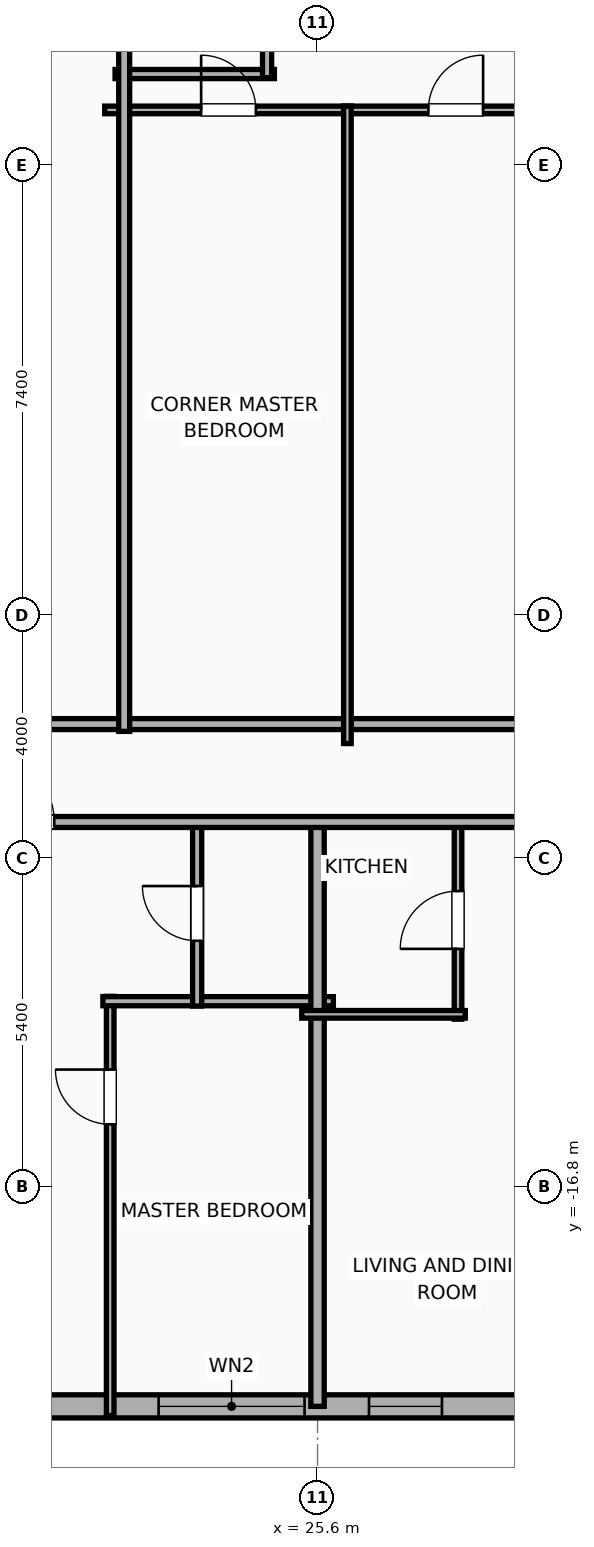
"""IFC4 building model, lengths in metres.
Left out: names, types, materials, properties, quantities, classifications, styles, units other than length and angle.
Written with IfcOpenShell. Run it as: python <this file> out.ifc"""

import sys

from ifc_helpers import new_model, si_unit, direction, frame, frame_2d, origin, place, context, subcontext, project, spatial, rectangle, extrude, element, fill, save


model = new_model("IFC4")
c1 = context("Model", 3, precision=1e-05, world=origin(), true_north=direction((0.0, 1.0)))
c2 = subcontext(c1, "Body", "Model", "MODEL_VIEW")
j1 = project(units=[si_unit("LENGTHUNIT", "METRE"), si_unit("PLANEANGLEUNIT", "RADIAN")], contexts=[c1])
p1 = place(None, origin())
s1 = spatial("IfcSite", under=j1, at=p1, CompositionType="ELEMENT")
p2 = place(p1, origin())
s2 = spatial("IfcBuilding", under=s1, at=p2, CompositionType="ELEMENT")
p3 = place(p2, frame((0.0, 0.0, 109.2)))
s3 = spatial("IfcBuildingStorey", under=s2, at=p3, CompositionType="ELEMENT", Elevation=109.2)
p4 = place(p3, frame((29.381, -20.41, 0.0), z_axis=(0.0, 0.0, 1.0), x_axis=(-1.0, 0.0, 0.0)))
e1 = element("IfcWall", 1, at=p4, inside=s3, PredefinedType="ELEMENTEDWALL", context=c2, shape_type="SweptSolid", body=[
    extrude(rectangle(XDim=54.763, YDim=0.38, at=frame_2d((27.381, 0.0))), origin(), (0.0, 0.0, 1.0), 3.65),
])
p5 = place(p4, frame((3.995, 0.0, 0.75)))
e2 = element("IfcOpeningElement", 2, at=p5, cuts=e1, PredefinedType="OPENING", context=c2, shape_type="SweptSolid", body=[
    extrude(rectangle(XDim=2.4, YDim=2.1, at=frame_2d((1.2, 1.05))), frame((0.0, 0.2, 0.0), z_axis=(0.0, -1.0, 0.0), x_axis=(1.0, 0.0, 0.0)), (0.0, 0.0, 1.0), 0.4),
])
p6 = place(p4, frame((18.486, 0.0, 0.75)))
e3 = element("IfcOpeningElement", 3, at=p6, cuts=e1, PredefinedType="OPENING", context=c2, shape_type="SweptSolid", body=[
    extrude(rectangle(XDim=2.4, YDim=2.1, at=frame_2d((1.2, 1.05))), frame((0.0, 0.2, 0.0), z_axis=(0.0, -1.0, 0.0), x_axis=(1.0, 0.0, 0.0)), (0.0, 0.0, 1.0), 0.4),
])
p7 = place(p4, frame((46.717, 0.0, 0.75)))
e4 = element("IfcOpeningElement", 4, at=p7, cuts=e1, PredefinedType="OPENING", context=c2, shape_type="SweptSolid", body=[
    extrude(rectangle(XDim=2.4, YDim=2.1, at=frame_2d((1.2, 1.05))), frame((0.0, 0.2, 0.0), z_axis=(0.0, -1.0, 0.0), x_axis=(1.0, 0.0, 0.0)), (0.0, 0.0, 1.0), 0.4),
])
p8 = place(p4, frame((52.651, 0.0, 0.75)))
e5 = element("IfcOpeningElement", 5, at=p8, cuts=e1, PredefinedType="OPENING", context=c2, shape_type="SweptSolid", body=[
    extrude(rectangle(XDim=1.2, YDim=2.05, at=frame_2d((0.6, 1.025))), frame((0.0, 0.2, 0.0), z_axis=(0.0, -1.0, 0.0), x_axis=(1.0, 0.0, 0.0)), (0.0, 0.0, 1.0), 0.4),
])
p9 = place(p4, frame((50.521, 0.0, 0.75)))
e6 = element("IfcOpeningElement", 6, at=p9, cuts=e1, PredefinedType="OPENING", context=c2, shape_type="SweptSolid", body=[
    extrude(rectangle(XDim=1.2, YDim=2.05, at=frame_2d((0.6, 1.025))), frame((0.0, 0.2, 0.0), z_axis=(0.0, -1.0, 0.0), x_axis=(1.0, 0.0, 0.0)), (0.0, 0.0, 1.0), 0.4),
])
p10 = place(p4, frame((40.191, 0.0, 0.75)))
e7 = element("IfcOpeningElement", 7, at=p10, cuts=e1, PredefinedType="OPENING", context=c2, shape_type="SweptSolid", body=[
    extrude(rectangle(XDim=1.2, YDim=2.05, at=frame_2d((0.6, 1.025))), frame((0.0, 0.2, 0.0), z_axis=(0.0, -1.0, 0.0), x_axis=(1.0, 0.0, 0.0)), (0.0, 0.0, 1.0), 0.4),
])
p11 = place(p4, frame((44.631, 0.0, 0.75)))
e8 = element("IfcOpeningElement", 8, at=p11, cuts=e1, PredefinedType="OPENING", context=c2, shape_type="SweptSolid", body=[
    extrude(rectangle(XDim=1.2, YDim=2.05, at=frame_2d((0.6, 1.025))), frame((0.0, 0.2, 0.0), z_axis=(0.0, -1.0, 0.0), x_axis=(1.0, 0.0, 0.0)), (0.0, 0.0, 1.0), 0.4),
])
p12 = place(p4, frame((36.561, 0.0, 0.75)))
e9 = element("IfcOpeningElement", 9, at=p12, cuts=e1, PredefinedType="OPENING", context=c2, shape_type="SweptSolid", body=[
    extrude(rectangle(XDim=1.2, YDim=2.05, at=frame_2d((0.6, 1.025))), frame((0.0, 0.2, 0.0), z_axis=(0.0, -1.0, 0.0), x_axis=(1.0, 0.0, 0.0)), (0.0, 0.0, 1.0), 0.4),
])
p13 = place(p4, frame((30.004, 0.0, 0.75)))
e10 = element("IfcOpeningElement", 10, at=p13, cuts=e1, PredefinedType="OPENING", context=c2, shape_type="SweptSolid", body=[
    extrude(rectangle(XDim=1.2, YDim=2.05, at=frame_2d((0.6, 1.025))), frame((0.0, 0.2, 0.0), z_axis=(0.0, -1.0, 0.0), x_axis=(1.0, 0.0, 0.0)), (0.0, 0.0, 1.0), 0.4),
])
p14 = place(p4, frame((33.599, 0.0, 0.75)))
e11 = element("IfcOpeningElement", 11, at=p14, cuts=e1, PredefinedType="OPENING", context=c2, shape_type="SweptSolid", body=[
    extrude(rectangle(XDim=1.2, YDim=2.05, at=frame_2d((0.6, 1.025))), frame((0.0, 0.2, 0.0), z_axis=(0.0, -1.0, 0.0), x_axis=(1.0, 0.0, 0.0)), (0.0, 0.0, 1.0), 0.4),
])
p15 = place(p4, frame((26.086, 0.0, 0.75)))
e12 = element("IfcOpeningElement", 12, at=p15, cuts=e1, PredefinedType="OPENING", context=c2, shape_type="SweptSolid", body=[
    extrude(rectangle(XDim=1.2, YDim=2.05, at=frame_2d((0.6, 1.025))), frame((0.0, 0.2, 0.0), z_axis=(0.0, -1.0, 0.0), x_axis=(1.0, 0.0, 0.0)), (0.0, 0.0, 1.0), 0.4),
])
p16 = place(p4, frame((22.626, 0.0, 0.75)))
e13 = element("IfcOpeningElement", 13, at=p16, cuts=e1, PredefinedType="OPENING", context=c2, shape_type="SweptSolid", body=[
    extrude(rectangle(XDim=1.2, YDim=2.05, at=frame_2d((0.6, 1.025))), frame((0.0, 0.2, 0.0), z_axis=(0.0, -1.0, 0.0), x_axis=(1.0, 0.0, 0.0)), (0.0, 0.0, 1.0), 0.4),
])
p17 = place(p4, frame((15.361, 0.0, 0.75)))
e14 = element("IfcOpeningElement", 14, at=p17, cuts=e1, PredefinedType="OPENING", context=c2, shape_type="SweptSolid", body=[
    extrude(rectangle(XDim=1.2, YDim=2.05, at=frame_2d((0.6, 1.025))), frame((0.0, 0.2, 0.0), z_axis=(0.0, -1.0, 0.0), x_axis=(1.0, 0.0, 0.0)), (0.0, 0.0, 1.0), 0.4),
])
p18 = place(p4, frame((8.986, 0.0, 0.75)))
e15 = element("IfcOpeningElement", 15, at=p18, cuts=e1, PredefinedType="OPENING", context=c2, shape_type="SweptSolid", body=[
    extrude(rectangle(XDim=1.2, YDim=2.05, at=frame_2d((0.6, 1.025))), frame((0.0, 0.2, 0.0), z_axis=(0.0, -1.0, 0.0), x_axis=(1.0, 0.0, 0.0)), (0.0, 0.0, 1.0), 0.4),
])
p19 = place(p4, frame((1.736, 0.0, 0.75)))
e16 = element("IfcOpeningElement", 16, at=p19, cuts=e1, PredefinedType="OPENING", context=c2, shape_type="SweptSolid", body=[
    extrude(rectangle(XDim=1.2, YDim=2.05, at=frame_2d((0.6, 1.025))), frame((0.0, 0.2, 0.0), z_axis=(0.0, -1.0, 0.0), x_axis=(1.0, 0.0, 0.0)), (0.0, 0.0, 1.0), 0.4),
])
p20 = place(p3, frame((9.88, -9.19, 0.0), z_axis=(0.0, 0.0, 1.0), x_axis=(1.0, 0.0, 0.0)))
e17 = element("IfcWall", 17, at=p20, inside=s3, PredefinedType="PARTITIONING", context=c2, shape_type="SweptSolid", body=[
    extrude(rectangle(XDim=23.33, YDim=0.18, at=frame_2d((11.665, 0.0))), origin(), (0.0, 0.0, 1.0), 3.65),
])
p21 = place(p3, frame((22.19, -20.56, 0.0), z_axis=(0.0, 0.0, 1.0), x_axis=(0.0, 1.0, 0.0)))
e18 = element("IfcWall", 18, at=p21, inside=s3, PredefinedType="PARTITIONING", context=c2, shape_type="SweptSolid", body=[
    extrude(rectangle(XDim=6.893, YDim=0.125, at=frame_2d((3.447, 0.0))), origin(), (0.0, 0.0, 1.0), 3.65),
])
p22 = place(p21, frame((4.789, 0.0, 0.0)))
e19 = element("IfcOpeningElement", 19, at=p22, cuts=e18, PredefinedType="OPENING", context=c2, shape_type="SweptSolid", body=[
    extrude(rectangle(XDim=0.9, YDim=2.05, at=frame_2d((0.45, 1.025))), frame((0.0, 0.073, 0.0), z_axis=(0.0, -1.0, 0.0), x_axis=(1.0, 0.0, 0.0)), (0.0, 0.0, 1.0), 0.145),
])
p23 = place(p3, frame((22.07, -13.747, 0.0), z_axis=(0.0, 0.0, 1.0), x_axis=(1.0, 0.0, 0.0)))
e20 = element("IfcWall", 20, at=p23, inside=s3, PredefinedType="PLUMBINGWALL", context=c2, shape_type="SweptSolid", body=[
    extrude(rectangle(XDim=3.79, YDim=0.15, at=frame_2d((1.895, 0.0))), origin(), (0.0, 0.0, 1.0), 3.65),
])
p24 = place(p3, frame((23.62, -13.827, 0.0), z_axis=(0.0, 0.0, 1.0), x_axis=(0.0, 1.0, 0.0)))
e21 = element("IfcWall", 21, at=p24, inside=s3, PredefinedType="PLUMBINGWALL", context=c2, shape_type="SweptSolid", body=[
    extrude(rectangle(XDim=3.047, YDim=0.15, at=frame_2d((1.523, 0.0))), origin(), (0.0, 0.0, 1.0), 3.65),
])
p25 = place(p24, frame((1.073, 0.0, 0.0)))
e22 = element("IfcOpeningElement", 22, at=p25, cuts=e21, PredefinedType="OPENING", context=c2, shape_type="SweptSolid", body=[
    extrude(rectangle(XDim=0.9, YDim=2.05, at=frame_2d((0.45, 1.025))), frame((0.0, 0.085, 0.0), z_axis=(0.0, -1.0, 0.0), x_axis=(1.0, 0.0, 0.0)), (0.0, 0.0, 1.0), 0.17),
])
p26 = place(p3, frame((25.6, -20.41, 0.0), z_axis=(0.0, 0.0, 1.0), x_axis=(0.0, 1.0, 0.0)))
e23 = element("IfcWall", 23, at=p26, inside=s3, PredefinedType="PARTITIONING", context=c2, shape_type="SweptSolid", body=[
    extrude(rectangle(XDim=9.69, YDim=0.22, at=frame_2d((4.845, 0.0))), origin(), (0.0, 0.0, 1.0), 3.65),
])
p27 = place(p3, frame((27.91, -14.043, 0.0), z_axis=(0.0, 0.0, 1.0), x_axis=(0.0, 1.0, 0.0)))
e24 = element("IfcWall", 24, at=p27, inside=s3, PredefinedType="PARTITIONING", context=c2, shape_type="SweptSolid", body=[
    extrude(rectangle(XDim=3.263, YDim=0.125, at=frame_2d((1.631, 0.0))), origin(), (0.0, 0.0, 1.0), 3.65),
])
p28 = place(p27, frame((1.156, 0.0, 0.0)))
e25 = element("IfcOpeningElement", 25, at=p28, cuts=e24, PredefinedType="OPENING", context=c2, shape_type="SweptSolid", body=[
    extrude(rectangle(XDim=0.95, YDim=2.05, at=frame_2d((0.475, 1.025))), frame((0.0, 0.073, 0.0), z_axis=(0.0, -1.0, 0.0), x_axis=(1.0, 0.0, 0.0)), (0.0, 0.0, 1.0), 0.145),
])
p29 = place(p3, frame((25.34, -13.963, 0.0), z_axis=(0.0, 0.0, 1.0), x_axis=(1.0, 0.0, 0.0)))
e26 = element("IfcWall", 26, at=p29, inside=s3, PredefinedType="PARTITIONING", context=c2, shape_type="SweptSolid", body=[
    extrude(rectangle(XDim=2.69, YDim=0.125, at=frame_2d((1.345, 0.0))), origin(), (0.0, 0.0, 1.0), 3.65),
])
p30 = place(p3, frame((-29.21, -10.8, 0.0), z_axis=(0.0, 0.0, 1.0), x_axis=(1.0, 0.0, 0.0)))
e27 = element("IfcWall", 27, at=p30, inside=s3, PredefinedType="PARTITIONING", context=c2, shape_type="SweptSolid", body=[
    extrude(rectangle(XDim=62.42, YDim=0.18, at=frame_2d((31.21, 0.0))), origin(), (0.0, 0.0, 1.0), 3.65),
])
p31 = place(p30, frame((2.74, 0.0, 0.0)))
e28 = element("IfcOpeningElement", 28, at=p31, cuts=e27, PredefinedType="OPENING", context=c2, shape_type="SweptSolid", body=[
    extrude(rectangle(XDim=0.9, YDim=2.05, at=frame_2d((0.45, 1.025))), frame((0.0, 0.1, 0.0), z_axis=(0.0, -1.0, 0.0), x_axis=(1.0, 0.0, 0.0)), (0.0, 0.0, 1.0), 0.2),
])
p32 = place(p30, frame((9.968, 0.0, 0.0)))
e29 = element("IfcOpeningElement", 29, at=p32, cuts=e27, PredefinedType="OPENING", context=c2, shape_type="SweptSolid", body=[
    extrude(rectangle(XDim=1.15, YDim=2.05, at=frame_2d((0.575, 1.025))), frame((0.0, 0.1, 0.0), z_axis=(0.0, -1.0, 0.0), x_axis=(1.0, 0.0, 0.0)), (0.0, 0.0, 1.0), 0.2),
])
p33 = place(p30, frame((17.227, 0.0, 0.0)))
e30 = element("IfcOpeningElement", 30, at=p33, cuts=e27, PredefinedType="OPENING", context=c2, shape_type="SweptSolid", body=[
    extrude(rectangle(XDim=1.15, YDim=2.05, at=frame_2d((0.575, 1.025))), frame((0.0, 0.1, 0.0), z_axis=(0.0, -1.0, 0.0), x_axis=(1.0, 0.0, 0.0)), (0.0, 0.0, 1.0), 0.2),
])
p34 = place(p30, frame((28.157, 0.0, 0.0)))
e31 = element("IfcOpeningElement", 31, at=p34, cuts=e27, PredefinedType="OPENING", context=c2, shape_type="SweptSolid", body=[
    extrude(rectangle(XDim=1.15, YDim=2.05, at=frame_2d((0.575, 1.025))), frame((0.0, 0.1, 0.0), z_axis=(0.0, -1.0, 0.0), x_axis=(1.0, 0.0, 0.0)), (0.0, 0.0, 1.0), 0.2),
])
p35 = place(p30, frame((38.512, 0.0, 0.0)))
e32 = element("IfcOpeningElement", 32, at=p35, cuts=e27, PredefinedType="OPENING", context=c2, shape_type="SweptSolid", body=[
    extrude(rectangle(XDim=1.15, YDim=2.05, at=frame_2d((0.575, 1.025))), frame((0.0, 0.1, 0.0), z_axis=(0.0, -1.0, 0.0), x_axis=(1.0, 0.0, 0.0)), (0.0, 0.0, 1.0), 0.2),
])
p36 = place(p30, frame((49.33, 0.0, 0.0)))
e33 = element("IfcOpeningElement", 33, at=p36, cuts=e27, PredefinedType="OPENING", context=c2, shape_type="SweptSolid", body=[
    extrude(rectangle(XDim=1.15, YDim=2.05, at=frame_2d((0.575, 1.025))), frame((0.0, 0.1, 0.0), z_axis=(0.0, -1.0, 0.0), x_axis=(1.0, 0.0, 0.0)), (0.0, 0.0, 1.0), 0.2),
])
p37 = place(p30, frame((58.237, 0.0, 0.0)))
e34 = element("IfcOpeningElement", 34, at=p37, cuts=e27, PredefinedType="OPENING", context=c2, shape_type="SweptSolid", body=[
    extrude(rectangle(XDim=1.15, YDim=2.05, at=frame_2d((0.575, 1.025))), frame((0.0, 0.1, 0.0), z_axis=(0.0, -1.0, 0.0), x_axis=(1.0, 0.0, 0.0)), (0.0, 0.0, 1.0), 0.2),
])
p38 = place(p3, frame((22.27, 1.5, 0.0), z_axis=(0.0, 0.0, 1.0), x_axis=(1.0, 0.0, 0.0)))
e35 = element("IfcWall", 35, at=p38, inside=s3, PredefinedType="PLUMBINGWALL", context=c2, shape_type="SweptSolid", body=[
    extrude(rectangle(XDim=2.62, YDim=0.15, at=frame_2d((1.31, 0.0))), origin(), (0.0, 0.0, 1.0), 3.65),
])
p39 = place(p3, frame((24.77, 1.44, 0.0), z_axis=(0.0, 0.0, 1.0), x_axis=(0.0, 1.0, 0.0)))
e36 = element("IfcWall", 36, at=p39, inside=s3, PredefinedType="PLUMBINGWALL", context=c2, shape_type="SweptSolid", body=[
    extrude(rectangle(XDim=3.12, YDim=0.15, at=frame_2d((1.56, 0.0))), origin(), (0.0, 0.0, 1.0), 3.65),
])
p40 = place(p39, frame((1.11, 0.0, 0.0)))
e37 = element("IfcOpeningElement", 37, at=p40, cuts=e36, PredefinedType="OPENING", context=c2, shape_type="SweptSolid", body=[
    extrude(rectangle(XDim=0.9, YDim=2.05, at=frame_2d((0.45, 1.025))), frame((0.0, 0.085, 0.0), z_axis=(0.0, -1.0, 0.0), x_axis=(1.0, 0.0, 0.0)), (0.0, 0.0, 1.0), 0.17),
])
p41 = place(p3, frame((22.1, 0.91, 0.0), z_axis=(0.0, 0.0, 1.0), x_axis=(1.0, 0.0, 0.0)))
e38 = element("IfcWall", 38, at=p41, inside=s3, PredefinedType="PARTITIONING", context=c2, shape_type="SweptSolid", body=[
    extrude(rectangle(XDim=4.053, YDim=0.125, at=frame_2d((2.027, 0.0))), origin(), (0.0, 0.0, 1.0), 3.65),
])
p42 = place(p41, frame((1.585, 0.0, 0.0)))
e39 = element("IfcOpeningElement", 39, at=p42, cuts=e38, PredefinedType="OPENING", context=c2, shape_type="SweptSolid", body=[
    extrude(rectangle(XDim=0.9, YDim=2.05, at=frame_2d((0.45, 1.025))), frame((0.0, 0.073, 0.0), z_axis=(0.0, -1.0, 0.0), x_axis=(1.0, 0.0, 0.0)), (0.0, 0.0, 1.0), 0.145),
])
p43 = place(p3, frame((26.029, 0.91, 0.0), z_axis=(0.0, 0.0, 1.0), x_axis=(1.0, 0.0, 0.0)))
e40 = element("IfcWall", 40, at=p43, inside=s3, PredefinedType="PARTITIONING", context=c2, shape_type="SweptSolid", body=[
    extrude(rectangle(XDim=3.688, YDim=0.125, at=frame_2d((1.844, 0.0))), origin(), (0.0, 0.0, 1.0), 3.65),
])
p44 = place(p43, frame((1.394, 0.0, 0.0)))
e41 = element("IfcOpeningElement", 41, at=p44, cuts=e40, PredefinedType="OPENING", context=c2, shape_type="SweptSolid", body=[
    extrude(rectangle(XDim=0.9, YDim=2.05, at=frame_2d((0.45, 1.025))), frame((0.0, 0.073, 0.0), z_axis=(0.0, -1.0, 0.0), x_axis=(1.0, 0.0, 0.0)), (0.0, 0.0, 1.0), 0.145),
])
p45 = place(p3, frame((26.091, -9.51, 0.0), z_axis=(0.0, 0.0, 1.0), x_axis=(0.0, 1.0, 0.0)))
e42 = element("IfcWall", 42, at=p45, inside=s3, PredefinedType="PARTITIONING", context=c2, shape_type="SweptSolid", body=[
    extrude(rectangle(XDim=10.48, YDim=0.125, at=frame_2d((5.24, 0.0))), origin(), (0.0, 0.0, 1.0), 3.65),
])
p46 = place(p3, frame((22.42, -9.31, 0.0), z_axis=(0.0, 0.0, 1.0), x_axis=(0.0, 1.0, 0.0)))
e43 = element("IfcWall", 43, at=p46, inside=s3, PredefinedType="PARTITIONING", context=c2, shape_type="SweptSolid", body=[
    extrude(rectangle(XDim=18.62, YDim=0.18, at=frame_2d((9.31, 0.0))), origin(), (0.0, 0.0, 1.0), 3.65),
])
p47 = place(p5, origin())
e44 = element("IfcWindow", 44, at=p47, inside=s3, PartitioningType="SINGLE_PANEL", PredefinedType="WINDOW", context=c2, shape_type="SweptSolid", body=[
    extrude(rectangle(XDim=2.4, YDim=2.1, at=frame_2d((1.2, 1.05))), frame((0.0, 0.03, 0.0), z_axis=(0.0, -1.0, 0.0), x_axis=(1.0, 0.0, 0.0)), (0.0, 0.0, 1.0), 0.06),
])
fill(e2, e44)
p48 = place(p19, origin())
e45 = element("IfcWindow", 45, at=p48, inside=s3, PartitioningType="SINGLE_PANEL", PredefinedType="WINDOW", context=c2, shape_type="SweptSolid", body=[
    extrude(rectangle(XDim=1.2, YDim=2.05, at=frame_2d((0.6, 1.025))), frame((0.0, 0.03, 0.0), z_axis=(0.0, -1.0, 0.0), x_axis=(1.0, 0.0, 0.0)), (0.0, 0.0, 1.0), 0.06),
])
fill(e16, e45)
p49 = place(p22, origin())
e46 = element("IfcDoor", 46, at=p49, inside=s3, OperationType="SINGLE_SWING_RIGHT", PredefinedType="DOOR", context=c2, shape_type="SweptSolid", body=[
    extrude(rectangle(XDim=0.9, YDim=2.05, at=frame_2d((0.45, 1.025))), frame((0.0, 0.025, 0.0), z_axis=(0.0, -1.0, 0.0), x_axis=(1.0, 0.0, 0.0)), (0.0, 0.0, 1.0), 0.05),
])
fill(e19, e46)
p50 = place(p25, origin())
e47 = element("IfcDoor", 47, at=p50, inside=s3, OperationType="SINGLE_SWING_RIGHT", PredefinedType="DOOR", context=c2, shape_type="SweptSolid", body=[
    extrude(rectangle(XDim=0.9, YDim=2.05, at=frame_2d((0.45, 1.025))), frame((0.0, 0.025, 0.0), z_axis=(0.0, -1.0, 0.0), x_axis=(1.0, 0.0, 0.0)), (0.0, 0.0, 1.0), 0.05),
])
fill(e22, e47)
p51 = place(p28, origin())
e48 = element("IfcDoor", 48, at=p51, inside=s3, OperationType="SINGLE_SWING_LEFT", PredefinedType="DOOR", context=c2, shape_type="SweptSolid", body=[
    extrude(rectangle(XDim=0.95, YDim=2.05, at=frame_2d((0.475, 1.025))), frame((0.0, 0.025, 0.0), z_axis=(0.0, -1.0, 0.0), x_axis=(1.0, 0.0, 0.0)), (0.0, 0.0, 1.0), 0.05),
])
fill(e25, e48)
p52 = place(p36, origin())
e49 = element("IfcDoor", 49, at=p52, inside=s3, OperationType="SINGLE_SWING_LEFT", PredefinedType="DOOR", context=c2, shape_type="SweptSolid", body=[
    extrude(rectangle(XDim=1.15, YDim=2.05, at=frame_2d((0.575, 1.025))), frame((0.0, 0.025, 0.0), z_axis=(0.0, -1.0, 0.0), x_axis=(1.0, 0.0, 0.0)), (0.0, 0.0, 1.0), 0.05),
])
fill(e33, e49)
p53 = place(p42, origin())
e50 = element("IfcDoor", 50, at=p53, inside=s3, OperationType="SINGLE_SWING_LEFT", PredefinedType="DOOR", context=c2, shape_type="SweptSolid", body=[
    extrude(rectangle(XDim=0.9, YDim=2.05, at=frame_2d((0.45, 1.025))), frame((0.0, 0.025, 0.0), z_axis=(0.0, -1.0, 0.0), x_axis=(1.0, 0.0, 0.0)), (0.0, 0.0, 1.0), 0.05),
])
fill(e39, e50)
p54 = place(p44, origin())
e51 = element("IfcDoor", 51, at=p54, inside=s3, OperationType="SINGLE_SWING_RIGHT", PredefinedType="DOOR", context=c2, shape_type="SweptSolid", body=[
    extrude(rectangle(XDim=0.9, YDim=2.05, at=frame_2d((0.45, 1.025))), frame((0.0, 0.025, 0.0), z_axis=(0.0, -1.0, 0.0), x_axis=(1.0, 0.0, 0.0)), (0.0, 0.0, 1.0), 0.05),
])
fill(e41, e51)
save(model, sys.argv[1])
